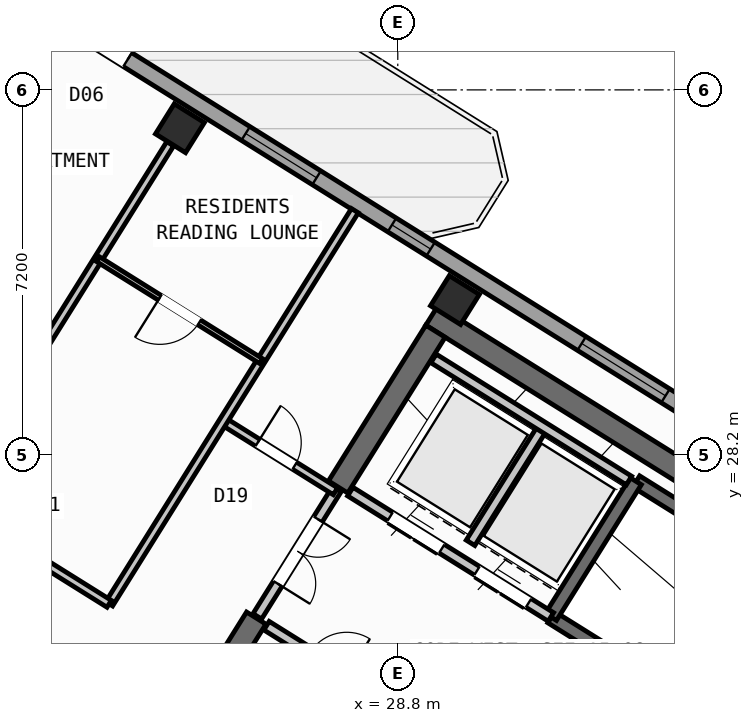
"""IFC4 building model, lengths in metres.
Left out: names, types, materials, properties, quantities, classifications, styles, units other than length and angle.
Written with IfcOpenShell. Run it as: python <this file> out.ifc"""

import sys

from ifc_helpers import new_model, si_unit, direction, frame, frame_2d, origin, origin_2d, place, context, subcontext, project, spatial, rectangle, hollow_rectangle, extrude, source, transform, mapped, element, fill, save


model = new_model("IFC4")
c1 = context("Model", 3, precision=1e-05, world=origin(), true_north=direction((0.0, 1.0)))
c2 = subcontext(c1, "Body", "Model", "MODEL_VIEW")
j1 = project(units=[si_unit("LENGTHUNIT", "METRE"), si_unit("PLANEANGLEUNIT", "RADIAN")], contexts=[c1])
p1 = place(None, origin())
s1 = spatial("IfcSite", under=j1, at=p1, CompositionType="ELEMENT")
p2 = place(p1, origin())
s2 = spatial("IfcBuilding", under=s1, at=p2, CompositionType="ELEMENT")
p3 = place(p2, frame((0.0, 0.0, 295.2)))
s3 = spatial("IfcBuildingStorey", under=s2, at=p3, CompositionType="ELEMENT", Elevation=295.2)
p4 = place(p3, frame((40.531, 24.036, 0.0), z_axis=(0.0, 0.0, 1.0), x_axis=(-0.848048787466, 0.529918157905, 0.0)))
e1 = element("IfcWall", 1, at=p4, inside=s3, PredefinedType="SHEAR", context=c2, shape_type="SweptSolid", body=[
    extrude(rectangle(XDim=13.04, YDim=0.45, at=frame_2d((6.52, 0.0))), origin(), (0.0, 0.0, 1.0), 3.32),
])
p5 = place(p3, frame((29.544, 30.636, 0.0), z_axis=(0.0, 0.0, 1.0), x_axis=(-0.529902075036, -0.848058836916, 0.0)))
e2 = element("IfcWall", 2, at=p5, inside=s3, PredefinedType="SHEAR", context=c2, shape_type="SweptSolid", body=[
    extrude(rectangle(XDim=3.625, YDim=0.45, at=frame_2d((1.812, 0.0))), origin(), (0.0, 0.0, 1.0), 3.32),
])
p6 = place(p3, frame((26.007, 24.976, 0.0), z_axis=(0.0, 0.0, 1.0), x_axis=(-0.529931155655, -0.848040665456, 0.0)))
e3 = element("IfcWall", 3, at=p6, inside=s3, PredefinedType="SHEAR", context=c2, shape_type="SweptSolid", body=[
    extrude(rectangle(XDim=6.475, YDim=0.45, at=frame_2d((3.238, 0.0))), origin(), (0.0, 0.0, 1.0), 3.32),
])
m1 = source(origin(), c2, "Body", "SweptSolid", [
    extrude(hollow_rectangle(XDim=0.7, YDim=0.7, WallThickness=0.028, at=origin_2d()), origin(), (0.0, 0.0, 1.0), 3.6),
])
for number, where, z_axis, x_axis in (
    (4, (29.928, 31.251, 0.0), (0.0, 0.0, 1.0), (-0.848, 0.53, 0.0)),
    (5, (24.5, 34.643, 0.0), (0.0, 0.0, 1.0), (-0.848, 0.53, 0.0)),
):
    element("IfcColumn", number, at=place(p3, frame(where, z_axis=z_axis, x_axis=x_axis)), inside=s3, PredefinedType="COLUMN", context=c2, shape_type="MappedRepresentation", body=[
        mapped(m1, transform((0.0, 0.0, 0.0), scale=1.0)),
    ])
p7 = place(p3, frame((19.566, 38.434, 0.0), z_axis=(0.0, 0.0, 1.0), x_axis=(0.84804567626, -0.529923136858, 0.0)))
e6 = element("IfcWall", 6, at=p7, inside=s3, PredefinedType="STANDARD", context=c2, shape_type="SweptSolid", body=[
    extrude(rectangle(XDim=25.188, YDim=0.32, at=frame_2d((12.594, 0.0))), origin(), (0.0, 0.0, 1.0), 3.32),
])
p8 = place(p7, frame((3.55, 0.0, 0.0)))
e7 = element("IfcOpeningElement", 7, at=p8, cuts=e6, PredefinedType="OPENING", context=c2, shape_type="SweptSolid", body=[
    extrude(rectangle(XDim=1.05, YDim=2.15, at=frame_2d((0.525, 1.075))), frame((0.0, 0.17, 0.0), z_axis=(0.0, -1.0, 0.0), x_axis=(1.0, 0.0, 0.0)), (0.0, 0.0, 1.0), 0.34),
])
p9 = place(p7, frame((7.349, 0.0, 0.9)))
e8 = element("IfcOpeningElement", 8, at=p9, cuts=e6, PredefinedType="OPENING", context=c2, shape_type="SweptSolid", body=[
    extrude(rectangle(XDim=1.65, YDim=1.45, at=frame_2d((0.825, 0.725))), frame((0.0, 0.17, 0.0), z_axis=(0.0, -1.0, 0.0), x_axis=(1.0, 0.0, 0.0)), (0.0, 0.0, 1.0), 0.34),
])
p10 = place(p7, frame((10.754, 0.0, 1.0)))
e9 = element("IfcOpeningElement", 9, at=p10, cuts=e6, PredefinedType="OPENING", context=c2, shape_type="SweptSolid", body=[
    extrude(rectangle(XDim=0.9, YDim=1.25, at=frame_2d((0.45, 0.625))), frame((0.0, 0.17, 0.0), z_axis=(0.0, -1.0, 0.0), x_axis=(1.0, 0.0, 0.0)), (0.0, 0.0, 1.0), 0.34),
])
p11 = place(p7, frame((15.169, 0.0, 0.95)))
e10 = element("IfcOpeningElement", 10, at=p11, cuts=e6, PredefinedType="OPENING", context=c2, shape_type="SweptSolid", body=[
    extrude(rectangle(XDim=1.95, YDim=1.35, at=frame_2d((0.975, 0.675))), frame((0.0, 0.17, 0.0), z_axis=(0.0, -1.0, 0.0), x_axis=(1.0, 0.0, 0.0)), (0.0, 0.0, 1.0), 0.34),
])
p12 = place(p7, frame((20.869, 0.0, 0.95)))
e11 = element("IfcOpeningElement", 11, at=p12, cuts=e6, PredefinedType="OPENING", context=c2, shape_type="SweptSolid", body=[
    extrude(rectangle(XDim=1.95, YDim=1.35, at=frame_2d((0.975, 0.675))), frame((0.0, 0.17, 0.0), z_axis=(0.0, -1.0, 0.0), x_axis=(1.0, 0.0, 0.0)), (0.0, 0.0, 1.0), 0.34),
])
p13 = place(p3, frame((39.721, 23.788, 0.0), z_axis=(0.0, 0.0, 1.0), x_axis=(-0.848054434086, 0.529909121291, 0.0)))
e12 = element("IfcWall", 12, at=p13, inside=s3, PredefinedType="SHEAR", context=c2, shape_type="SweptSolid", body=[
    extrude(rectangle(XDim=7.33, YDim=0.26, at=frame_2d((3.665, 0.0))), origin(), (0.0, 0.0, 1.0), 3.32),
])
p14 = place(p3, frame((38.046, 21.108, 0.0), z_axis=(0.0, 0.0, 1.0), x_axis=(-0.848054434086, 0.529909121291, 0.0)))
e13 = element("IfcWall", 13, at=p14, inside=s3, PredefinedType="SHEAR", context=c2, shape_type="SweptSolid", body=[
    extrude(rectangle(XDim=7.33, YDim=0.26, at=frame_2d((3.665, 0.0))), origin(), (0.0, 0.0, 1.0), 3.32),
])
p15 = place(p14, frame((0.22, 0.0, 0.0)))
e14 = element("IfcOpeningElement", 14, at=p15, cuts=e13, PredefinedType="OPENING", context=c2, shape_type="SweptSolid", body=[
    extrude(rectangle(XDim=1.1, YDim=2.1, at=frame_2d((0.55, 1.05))), frame((0.0, 0.14, 0.0), z_axis=(0.0, -1.0, 0.0), x_axis=(1.0, 0.0, 0.0)), (0.0, 0.0, 1.0), 0.28),
])
p16 = place(p3, frame((33.496, 27.677, 0.0), z_axis=(0.0, 0.0, 1.0), x_axis=(-0.529908658664, -0.84805472316, 0.0)))
e15 = element("IfcWall", 15, at=p16, inside=s3, PredefinedType="SHEAR", context=c2, shape_type="SweptSolid", body=[
    extrude(rectangle(XDim=3.16, YDim=0.26, at=frame_2d((1.58, 0.0))), origin(), (0.0, 0.0, 1.0), 3.32),
])
p17 = place(p3, frame((31.822, 24.998, 0.0), z_axis=(0.0, 0.0, 1.0), x_axis=(-0.848054125777, 0.529909614701, 0.0)))
e16 = element("IfcWall", 16, at=p17, inside=s3, PredefinedType="STANDARD", context=c2, shape_type="SweptSolid", body=[
    extrude(rectangle(XDim=4.668, YDim=0.2, at=frame_2d((2.334, 0.0))), origin(), (0.0, 0.0, 1.0), 3.31),
])
p18 = place(p17, frame((0.52, 0.0, 0.0)))
e17 = element("IfcOpeningElement", 17, at=p18, cuts=e16, PredefinedType="OPENING", context=c2, shape_type="SweptSolid", body=[
    extrude(rectangle(XDim=1.2, YDim=2.15, at=frame_2d((0.6, 1.075))), frame((0.0, 0.11, 0.0), z_axis=(0.0, -1.0, 0.0), x_axis=(1.0, 0.0, 0.0)), (0.0, 0.0, 1.0), 0.22),
])
p19 = place(p17, frame((2.54, 0.0, 0.0)))
e18 = element("IfcOpeningElement", 18, at=p19, cuts=e16, PredefinedType="OPENING", context=c2, shape_type="SweptSolid", body=[
    extrude(rectangle(XDim=1.2, YDim=2.15, at=frame_2d((0.6, 1.075))), frame((0.0, 0.11, 0.0), z_axis=(0.0, -1.0, 0.0), x_axis=(1.0, 0.0, 0.0)), (0.0, 0.0, 1.0), 0.22),
])
p20 = place(p3, frame((31.645, 28.716, 0.0), z_axis=(0.0, 0.0, 1.0), x_axis=(-0.52986693015, -0.848080795876, 0.0)))
e19 = element("IfcWall", 19, at=p20, inside=s3, PredefinedType="STANDARD", context=c2, shape_type="SweptSolid", body=[
    extrude(rectangle(XDim=2.66, YDim=0.2, at=frame_2d((1.33, 0.0))), origin(), (0.0, 0.0, 1.0), 3.31),
])
p21 = place(p3, frame((33.363, 27.69, 0.0), z_axis=(0.0, 0.0, 1.0), x_axis=(-0.84804957148, 0.529916903215, 0.0)))
e20 = element("IfcWall", 20, at=p21, inside=s3, PredefinedType="STANDARD", context=c2, shape_type="SweptSolid", body=[
    extrude(rectangle(XDim=4.548, YDim=0.2, at=frame_2d((2.274, 0.0))), origin(), (0.0, 0.0, 1.0), 3.31),
])
p22 = place(p3, frame((31.525, 21.504, 0.0), z_axis=(0.0, 0.0, 1.0), x_axis=(-0.848042066329, 0.529928913853, 0.0)))
e21 = element("IfcWall", 21, at=p22, inside=s3, PredefinedType="STANDARD", context=c2, shape_type="SweptSolid", body=[
    extrude(rectangle(XDim=6.268, YDim=0.2, at=frame_2d((3.134, 0.0))), origin(), (0.0, 0.0, 1.0), 3.31),
])
p23 = place(p22, frame((4.4, 0.0, 0.0)))
e22 = element("IfcOpeningElement", 22, at=p23, cuts=e21, PredefinedType="OPENING", context=c2, shape_type="SweptSolid", body=[
    extrude(rectangle(XDim=0.86, YDim=2.05, at=frame_2d((0.43, 1.025))), frame((0.0, 0.11, 0.0), z_axis=(0.0, -1.0, 0.0), x_axis=(1.0, 0.0, 0.0)), (0.0, 0.0, 1.0), 0.22),
])
p24 = place(p22, frame((0.35, 0.0, 0.0)))
e23 = element("IfcOpeningElement", 23, at=p24, cuts=e21, PredefinedType="OPENING", context=c2, shape_type="SweptSolid", body=[
    extrude(rectangle(XDim=0.86, YDim=2.05, at=frame_2d((0.43, 1.025))), frame((0.0, 0.11, 0.0), z_axis=(0.0, -1.0, 0.0), x_axis=(1.0, 0.0, 0.0)), (0.0, 0.0, 1.0), 0.22),
])
p25 = place(p3, frame((27.596, 27.52, 0.0), z_axis=(0.0, 0.0, 1.0), x_axis=(-0.529865479138, -0.848081702443, 0.0)))
e24 = element("IfcWall", 24, at=p25, inside=s3, PredefinedType="STANDARD", context=c2, shape_type="SweptSolid", body=[
    extrude(rectangle(XDim=2.96, YDim=0.2, at=frame_2d((1.48, 0.0))), origin(), (0.0, 0.0, 1.0), 3.31),
])
p26 = place(p25, frame((0.7, 0.0, 0.0)))
e25 = element("IfcOpeningElement", 25, at=p26, cuts=e24, PredefinedType="OPENING", context=c2, shape_type="SweptSolid", body=[
    extrude(rectangle(XDim=1.5, YDim=2.15, at=frame_2d((0.75, 1.075))), frame((0.0, 0.11, 0.0), z_axis=(0.0, -1.0, 0.0), x_axis=(1.0, 0.0, 0.0)), (0.0, 0.0, 1.0), 0.22),
])
p27 = place(p3, frame((27.57, 27.478, 0.0), z_axis=(0.0, 0.0, 1.0), x_axis=(-0.848050851465, 0.529914854792, 0.0)))
e26 = element("IfcWall", 26, at=p27, inside=s3, PredefinedType="PARTITIONING", context=c2, shape_type="SweptSolid", body=[
    extrude(rectangle(XDim=2.61, YDim=0.16, at=frame_2d((1.305, 0.0))), origin(), (0.0, 0.0, 1.0), 3.31),
])
p28 = place(p27, frame((0.95, 0.0, 0.0)))
e27 = element("IfcOpeningElement", 27, at=p28, cuts=e26, PredefinedType="OPENING", context=c2, shape_type="SweptSolid", body=[
    extrude(rectangle(XDim=0.86, YDim=2.05, at=frame_2d((0.43, 1.025))), frame((0.0, 0.09, 0.0), z_axis=(0.0, -1.0, 0.0), x_axis=(1.0, 0.0, 0.0)), (0.0, 0.0, 1.0), 0.18),
])
p29 = place(p3, frame((27.953, 33.016, 0.0), z_axis=(0.0, 0.0, 1.0), x_axis=(-0.529903001606, -0.848058257957, 0.0)))
e28 = element("IfcWall", 28, at=p29, inside=s3, PredefinedType="PARTITIONING", context=c2, shape_type="SweptSolid", body=[
    extrude(rectangle(XDim=9.15, YDim=0.16, at=frame_2d((4.575, 0.0))), origin(), (0.0, 0.0, 1.0), 3.31),
])
p30 = place(p3, frame((23.104, 25.256, 0.0), z_axis=(0.0, 0.0, 1.0), x_axis=(-0.848043444964, 0.529926707624, 0.0)))
e29 = element("IfcWall", 29, at=p30, inside=s3, PredefinedType="PARTITIONING", context=c2, shape_type="SweptSolid", body=[
    extrude(rectangle(XDim=10.33, YDim=0.16, at=frame_2d((5.165, 0.0))), origin(), (0.0, 0.0, 1.0), 3.31),
])
p31 = place(p30, frame((1.395, 0.0, 0.0)))
e30 = element("IfcOpeningElement", 30, at=p31, cuts=e29, PredefinedType="OPENING", context=c2, shape_type="SweptSolid", body=[
    extrude(rectangle(XDim=1.0, YDim=2.1, at=frame_2d((0.5, 1.05))), frame((0.0, 0.09, 0.0), z_axis=(0.0, -1.0, 0.0), x_axis=(1.0, 0.0, 0.0)), (0.0, 0.0, 1.0), 0.18),
])
p32 = place(p30, frame((7.904, 0.0, 0.0)))
e31 = element("IfcOpeningElement", 31, at=p32, cuts=e29, PredefinedType="OPENING", context=c2, shape_type="SweptSolid", body=[
    extrude(rectangle(XDim=1.0, YDim=2.1, at=frame_2d((0.5, 1.05))), frame((0.0, 0.09, 0.0), z_axis=(0.0, -1.0, 0.0), x_axis=(1.0, 0.0, 0.0)), (0.0, 0.0, 1.0), 0.18),
])
p33 = place(p3, frame((24.309, 34.336, 0.0), z_axis=(0.0, 0.0, 1.0), x_axis=(-0.529895484599, -0.848062954858, 0.0)))
e32 = element("IfcWall", 32, at=p33, inside=s3, PredefinedType="PARTITIONING", context=c2, shape_type="SweptSolid", body=[
    extrude(rectangle(XDim=6.576, YDim=0.16, at=frame_2d((3.288, 0.0))), origin(), (0.0, 0.0, 1.0), 3.31),
])
p34 = place(p3, frame((26.099, 30.05, 0.0), z_axis=(0.0, 0.0, 1.0), x_axis=(-0.84803087207, 0.529946827537, 0.0)))
e33 = element("IfcWall", 33, at=p34, inside=s3, PredefinedType="PARTITIONING", context=c2, shape_type="SweptSolid", body=[
    extrude(rectangle(XDim=3.79, YDim=0.11, at=frame_2d((1.895, 0.0))), origin(), (0.0, 0.0, 1.0), 3.31),
])
p35 = place(p34, frame((1.435, 0.0, 0.0)))
e34 = element("IfcOpeningElement", 34, at=p35, cuts=e33, PredefinedType="OPENING", context=c2, shape_type="SweptSolid", body=[
    extrude(rectangle(XDim=0.92, YDim=2.08, at=frame_2d((0.46, 1.04))), frame((0.0, 0.065, 0.0), z_axis=(0.0, -1.0, 0.0), x_axis=(1.0, 0.0, 0.0)), (0.0, 0.0, 1.0), 0.13),
])
m2 = source(origin(), c2, "Body", "SweptSolid", [
    extrude(rectangle(XDim=1.05, YDim=2.15, at=frame_2d((0.525, 1.075))), frame((0.0, 0.025, 0.0), z_axis=(0.0, -1.0, 0.0), x_axis=(1.0, 0.0, 0.0)), (0.0, 0.0, 1.0), 0.05),
])
p36 = place(p8, origin())
e35 = element("IfcDoor", 35, at=p36, inside=s3, OperationType="SINGLE_SWING_RIGHT", PredefinedType="DOOR", context=c2, shape_type="MappedRepresentation", body=[
    mapped(m2, transform((0.0, 0.0, 0.0), scale=1.0)),
])
fill(e7, e35)
m3 = source(origin(), c2, "Body", "SweptSolid", [
    extrude(rectangle(XDim=1.65, YDim=1.45, at=frame_2d((0.825, 0.725))), frame((0.0, 0.03, 0.0), z_axis=(0.0, -1.0, 0.0), x_axis=(1.0, 0.0, 0.0)), (0.0, 0.0, 1.0), 0.06),
])
p37 = place(p9, origin())
e36 = element("IfcWindow", 36, at=p37, inside=s3, PartitioningType="SINGLE_PANEL", PredefinedType="WINDOW", context=c2, shape_type="MappedRepresentation", body=[
    mapped(m3, transform((0.0, 0.0, 0.0), scale=1.0)),
])
fill(e8, e36)
m4 = source(origin(), c2, "Body", "SweptSolid", [
    extrude(rectangle(XDim=0.9, YDim=1.25, at=frame_2d((0.45, 0.625))), frame((0.0, 0.03, 0.0), z_axis=(0.0, -1.0, 0.0), x_axis=(1.0, 0.0, 0.0)), (0.0, 0.0, 1.0), 0.06),
])
p38 = place(p10, origin())
e37 = element("IfcWindow", 37, at=p38, inside=s3, PartitioningType="SINGLE_PANEL", PredefinedType="WINDOW", context=c2, shape_type="MappedRepresentation", body=[
    mapped(m4, transform((0.0, 0.0, 0.0), scale=1.0)),
])
fill(e9, e37)
m5 = source(origin(), c2, "Body", "SweptSolid", [
    extrude(rectangle(XDim=1.95, YDim=1.35, at=frame_2d((0.975, 0.675))), frame((0.0, 0.03, 0.0), z_axis=(0.0, -1.0, 0.0), x_axis=(1.0, 0.0, 0.0)), (0.0, 0.0, 1.0), 0.06),
])
p39 = place(p11, origin())
e38 = element("IfcWindow", 38, at=p39, inside=s3, PartitioningType="SINGLE_PANEL", PredefinedType="WINDOW", context=c2, shape_type="MappedRepresentation", body=[
    mapped(m5, transform((0.0, 0.0, 0.0), scale=1.0)),
])
fill(e10, e38)
m6 = source(origin(), c2, "Body", "SweptSolid", [
    extrude(rectangle(XDim=1.2, YDim=2.15, at=frame_2d((0.6, 1.075))), frame((0.0, 0.025, 0.0), z_axis=(0.0, -1.0, 0.0), x_axis=(1.0, 0.0, 0.0)), (0.0, 0.0, 1.0), 0.05),
])
p40 = place(p18, origin())
e39 = element("IfcDoor", 39, at=p40, inside=s3, OperationType="DOUBLE_DOOR_SLIDING", PredefinedType="DOOR", context=c2, shape_type="MappedRepresentation", body=[
    mapped(m6, transform((0.0, 0.0, 0.0), scale=1.0)),
])
fill(e17, e39)
p41 = place(p19, origin())
e40 = element("IfcDoor", 40, at=p41, inside=s3, OperationType="DOUBLE_DOOR_SLIDING", PredefinedType="DOOR", context=c2, shape_type="MappedRepresentation", body=[
    mapped(m6, transform((0.0, 0.0, 0.0), scale=1.0)),
])
fill(e18, e40)
m7 = source(origin(), c2, "Body", "SweptSolid", [
    extrude(rectangle(XDim=0.86, YDim=2.05, at=frame_2d((0.43, 1.025))), frame((0.0, 0.025, 0.0), z_axis=(0.0, -1.0, 0.0), x_axis=(1.0, 0.0, 0.0)), (0.0, 0.0, 1.0), 0.05),
])
p42 = place(p28, frame((0.86, 0.0, 0.0), z_axis=(0.0, 0.0, 1.0), x_axis=(-1.0, 0.0, 0.0)))
e41 = element("IfcDoor", 41, at=p42, inside=s3, OperationType="SINGLE_SWING_LEFT", PredefinedType="DOOR", context=c2, shape_type="MappedRepresentation", body=[
    mapped(m7, transform((0.0, 0.0, 0.0), scale=1.0)),
])
fill(e27, e41)
m8 = source(origin(), c2, "Body", "SweptSolid", [
    extrude(rectangle(XDim=1.5, YDim=2.15, at=frame_2d((0.75, 1.075))), frame((0.0, 0.025, 0.0), z_axis=(0.0, -1.0, 0.0), x_axis=(1.0, 0.0, 0.0)), (0.0, 0.0, 1.0), 0.05),
])
p43 = place(p26, origin())
e42 = element("IfcDoor", 42, at=p43, inside=s3, OperationType="DOUBLE_DOOR_SINGLE_SWING", PredefinedType="DOOR", context=c2, shape_type="MappedRepresentation", body=[
    mapped(m8, transform((0.0, 0.0, 0.0), scale=1.0)),
])
fill(e25, e42)
m9 = source(origin(), c2, "Body", "SweptSolid", [
    extrude(rectangle(XDim=0.92, YDim=2.08, at=frame_2d((0.46, 1.04))), frame((0.0, 0.025, 0.0), z_axis=(0.0, -1.0, 0.0), x_axis=(1.0, 0.0, 0.0)), (0.0, 0.0, 1.0), 0.05),
])
p44 = place(p35, origin())
e43 = element("IfcDoor", 43, at=p44, inside=s3, OperationType="SINGLE_SWING_RIGHT", PredefinedType="DOOR", context=c2, shape_type="MappedRepresentation", body=[
    mapped(m9, transform((0.0, 0.0, 0.0), scale=1.0)),
])
fill(e34, e43)
save(model, sys.argv[1])
